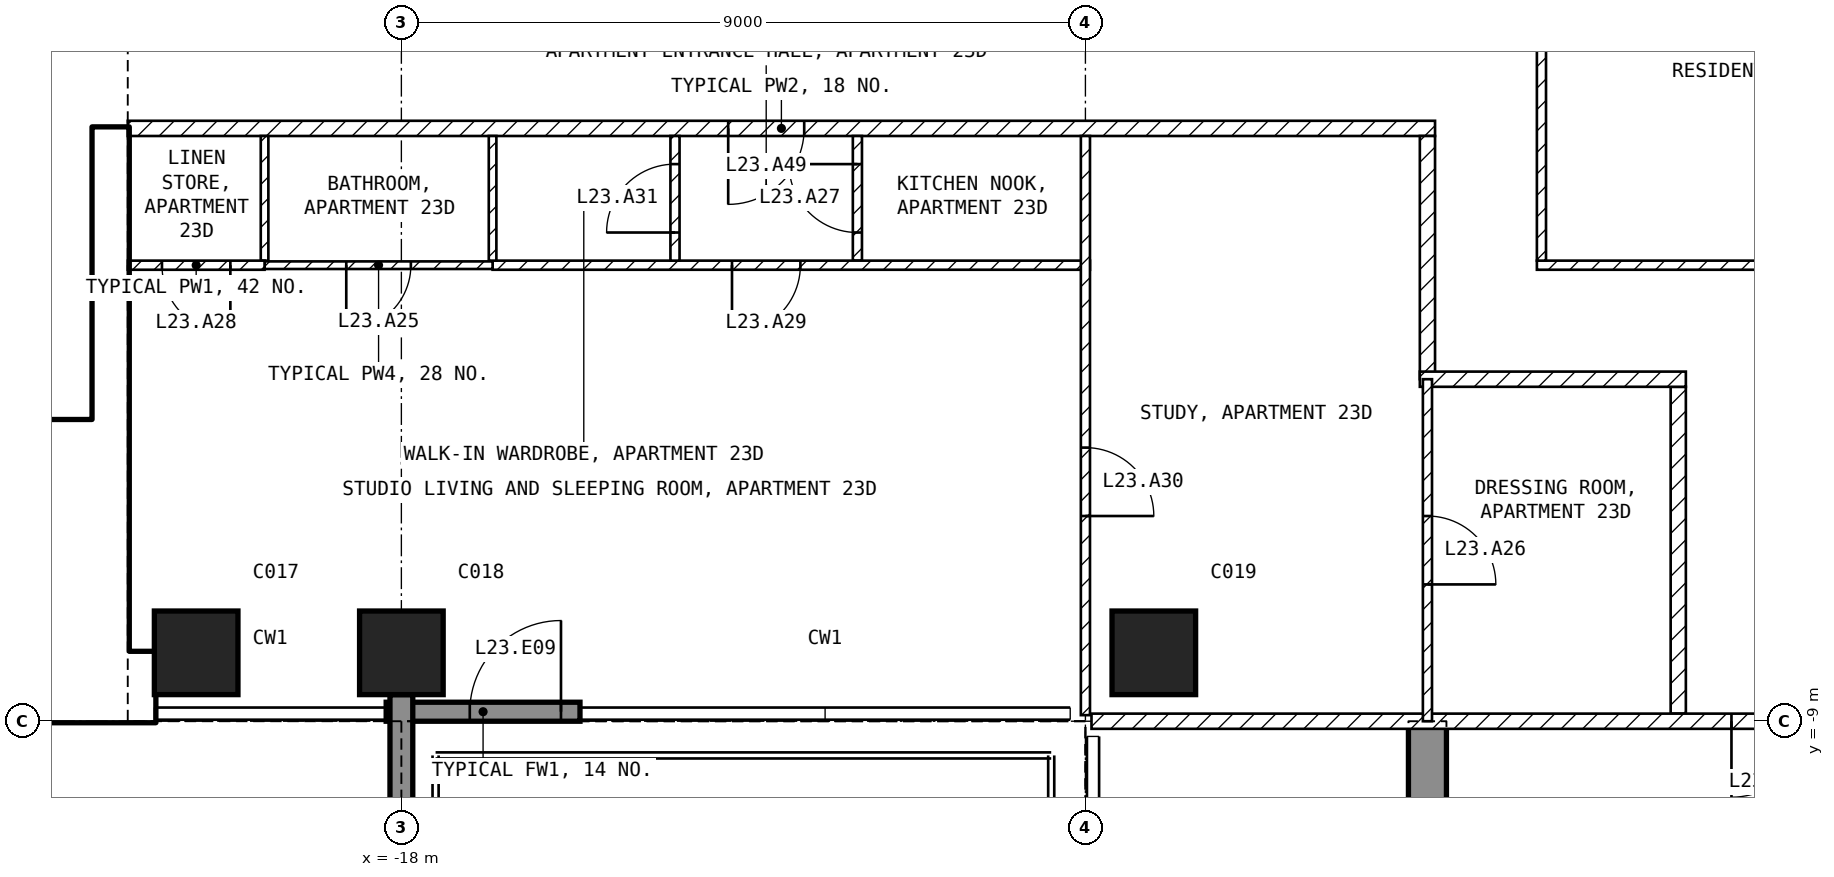
"""IFC4 building model, lengths in metres.
Left out: names, types, materials, properties, quantities, classifications, styles, units other than length and angle.
Written with IfcOpenShell. Run it as: python <this file> out.ifc"""

import sys

from ifc_helpers import new_model, si_unit, direction, frame, frame_2d, origin, origin_2d, place, context, subcontext, project, spatial, polyline, rectangle, outline, extrude, element, fill, save


model = new_model("IFC4")
c1 = context("Model", 3, precision=1e-05, world=origin(), true_north=direction((0.0, 1.0)))
c2 = subcontext(c1, "Body", "Model", "MODEL_VIEW")
j1 = project(units=[si_unit("LENGTHUNIT", "METRE"), si_unit("PLANEANGLEUNIT", "RADIAN")], contexts=[c1])
p1 = place(None, origin())
s1 = spatial("IfcSite", under=j1, at=p1, CompositionType="ELEMENT")
p2 = place(p1, origin())
s2 = spatial("IfcBuilding", under=s1, at=p2, CompositionType="ELEMENT")
p3 = place(p2, frame((0.0, 0.0, 102.4)))
s3 = spatial("IfcBuildingStorey", under=s2, at=p3, CompositionType="ELEMENT", Elevation=102.4)
for number, where, z_axis, x_axis in (
    (1, (-20.7, -8.1, -0.25), (0.0, 0.0, 1.0), (1.0, 0.0, 0.0)),
    (2, (-18.0, -8.1, -0.25), (0.0, 0.0, 1.0), (1.0, 0.0, 0.0)),
    (3, (-8.1, -8.1, -0.25), (0.0, 0.0, 1.0), (1.0, 0.0, 0.0)),
):
    element("IfcColumn", number, at=place(p3, frame(where, z_axis=z_axis, x_axis=x_axis)), inside=s3, PredefinedType="COLUMN", context=c2, shape_type="SweptSolid", body=[
        extrude(rectangle(XDim=1.1, YDim=1.1, at=origin_2d()), origin(), (0.0, 0.0, 1.0), 3.5),
    ])
p4 = place(p3, frame((-4.75, -20.15, -0.25), z_axis=(1.0, 0.0, 0.0), x_axis=(0.0, 1.0, 0.0)))
e4 = element("IfcWall", 4, at=p4, inside=s3, PredefinedType="SHEAR", context=c2, shape_type="SweptSolid", body=[
    extrude(outline(polyline([(0.0, 0.0), (6.65, 0.0), (6.65, 2.65), (9.05, 2.65), (9.05, 0.0), (11.15, 0.0), (11.15, 3.5), (0.0, 3.5), (0.0, 0.0)])), origin(), (0.0, 0.0, 1.0), 0.5),
])
p5 = place(p3, frame((-18.2, -8.875, 0.0), z_axis=(0.0, 0.0, 1.0), x_axis=(1.0, 0.0, 0.0)))
e5 = element("IfcWall", 5, at=p5, inside=s3, PredefinedType="SOLIDWALL", context=c2, shape_type="SweptSolid", body=[
    extrude(rectangle(XDim=2.55, YDim=0.25, at=frame_2d((1.275, 0.0))), origin(), (0.0, 0.0, 1.0), 3.25),
])
p6 = place(p5, frame((1.1, 0.0, 0.0)))
e6 = element("IfcOpeningElement", 6, at=p6, cuts=e5, PredefinedType="OPENING", context=c2, shape_type="SweptSolid", body=[
    extrude(rectangle(XDim=1.2, YDim=2.4, at=frame_2d((0.6, 1.2))), frame((0.0, 0.135, 0.0), z_axis=(0.0, -1.0, 0.0), x_axis=(1.0, 0.0, 0.0)), (0.0, 0.0, 1.0), 0.27),
])
p7 = place(p3, frame((-18.0, -8.65, 0.0), z_axis=(0.0, 0.0, 1.0), x_axis=(0.0, -1.0, 0.0)))
e7 = element("IfcWall", 7, at=p7, inside=s3, PredefinedType="SOLIDWALL", context=c2, shape_type="SweptSolid", body=[
    extrude(rectangle(XDim=3.09, YDim=0.3, at=frame_2d((1.545, 0.0))), origin(), (0.0, 0.0, 1.0), 3.25),
])
p8 = place(p3, frame((-30.2, -8.55, 0.0), z_axis=(0.0, 0.0, 1.0), x_axis=(1.0, 0.0, 0.0)))
e8 = element("IfcWall", 8, at=p8, inside=s3, PredefinedType="SHEAR", context=c2, shape_type="SweptSolid", body=[
    extrude(rectangle(XDim=8.95, YDim=0.9, at=frame_2d((4.475, 0.0))), origin(), (0.0, 0.0, 1.0), 3.25),
])
p9 = place(p3, frame((-21.825, -8.1, 0.0), z_axis=(0.0, 0.0, 1.0), x_axis=(0.0, 1.0, 0.0)))
e9 = element("IfcWall", 9, at=p9, inside=s3, PredefinedType="SHEAR", context=c2, shape_type="SweptSolid", body=[
    extrude(rectangle(XDim=6.9, YDim=0.45, at=frame_2d((3.45, 0.0))), origin(), (0.0, 0.0, 1.0), 3.25),
])
p10 = place(p3, frame((-28.35, -5.15, 0.0), z_axis=(0.0, 0.0, 1.0), x_axis=(1.0, 0.0, 0.0)))
e10 = element("IfcWall", 10, at=p10, inside=s3, PredefinedType="SOLIDWALL", context=c2, shape_type="SweptSolid", body=[
    extrude(rectangle(XDim=6.3, YDim=0.2, at=frame_2d((3.15, 0.0))), origin(), (0.0, 0.0, 1.0), 3.25),
])
p11 = place(p10, frame((5.1, 0.0, 0.0)))
e11 = element("IfcOpeningElement", 11, at=p11, cuts=e10, PredefinedType="OPENING", context=c2, shape_type="SweptSolid", body=[
    extrude(rectangle(XDim=1.0, YDim=2.1, at=frame_2d((0.5, 1.05))), frame((0.0, 0.11, 0.0), z_axis=(0.0, -1.0, 0.0), x_axis=(1.0, 0.0, 0.0)), (0.0, 0.0, 1.0), 0.22),
])
p12 = place(p3, frame((-3.06, -3.0, 0.0), z_axis=(0.0, 0.0, 1.0), x_axis=(1.0, 0.0, 0.0)))
e12 = element("IfcWall", 12, at=p12, inside=s3, PredefinedType="PARTITIONING", context=c2, shape_type="SweptSolid", body=[
    extrude(rectangle(XDim=6.12, YDim=0.12, at=frame_2d((3.06, 0.0))), origin(), (0.0, 0.0, 1.0), 3.25),
])
p13 = place(p3, frame((-3.0, 2.94, 0.0), z_axis=(0.0, 0.0, 1.0), x_axis=(0.0, -1.0, 0.0)))
e13 = element("IfcWall", 13, at=p13, inside=s3, PredefinedType="PARTITIONING", context=c2, shape_type="SweptSolid", body=[
    extrude(rectangle(XDim=5.88, YDim=0.12, at=frame_2d((2.94, 0.0))), origin(), (0.0, 0.0, 1.0), 3.25),
])
p14 = place(p3, frame((-4.4, -1.2, 0.0), z_axis=(0.0, 0.0, 1.0), x_axis=(-1.0, 0.0, 0.0)))
e14 = element("IfcWall", 14, at=p14, inside=s3, PredefinedType="PARTITIONING", context=c2, shape_type="SweptSolid", body=[
    extrude(rectangle(XDim=17.2, YDim=0.2, at=frame_2d((8.6, 0.0))), origin(), (0.0, 0.0, 1.0), 3.25),
])
p15 = place(p14, frame((8.3, 0.0, 0.0)))
e15 = element("IfcOpeningElement", 15, at=p15, cuts=e14, PredefinedType="OPENING", context=c2, shape_type="SweptSolid", body=[
    extrude(rectangle(XDim=1.0, YDim=2.1, at=frame_2d((0.5, 1.05))), frame((0.0, 0.11, 0.0), z_axis=(0.0, -1.0, 0.0), x_axis=(1.0, 0.0, 0.0)), (0.0, 0.0, 1.0), 0.22),
])
p16 = place(p3, frame((-4.5, -4.5, 0.0), z_axis=(0.0, 0.0, 1.0), x_axis=(0.0, 1.0, 0.0)))
e16 = element("IfcWall", 16, at=p16, inside=s3, PredefinedType="PARTITIONING", context=c2, shape_type="SweptSolid", body=[
    extrude(rectangle(XDim=3.2, YDim=0.2, at=frame_2d((1.6, 0.0))), origin(), (0.0, 0.0, 1.0), 3.25),
])
p17 = place(p3, frame((-1.2, -8.9, 0.0), z_axis=(0.0, 0.0, 1.0), x_axis=(0.0, 1.0, 0.0)))
e17 = element("IfcWall", 17, at=p17, inside=s3, PredefinedType="PARTITIONING", context=c2, shape_type="SweptSolid", body=[
    extrude(rectangle(XDim=4.3, YDim=0.2, at=frame_2d((2.15, 0.0))), origin(), (0.0, 0.0, 1.0), 3.25),
])
p18 = place(p3, frame((-1.1, -4.5, 0.0), z_axis=(0.0, 0.0, 1.0), x_axis=(-1.0, 0.0, 0.0)))
e18 = element("IfcWall", 18, at=p18, inside=s3, PredefinedType="PARTITIONING", context=c2, shape_type="SweptSolid", body=[
    extrude(rectangle(XDim=3.5, YDim=0.2, at=frame_2d((1.75, 0.0))), origin(), (0.0, 0.0, 1.0), 3.25),
])
p19 = place(p3, frame((8.92, -9.0, 0.0), z_axis=(0.0, 0.0, 1.0), x_axis=(-1.0, 0.0, 0.0)))
e19 = element("IfcWall", 19, at=p19, inside=s3, PredefinedType="PARTITIONING", context=c2, shape_type="SweptSolid", body=[
    extrude(rectangle(XDim=17.84, YDim=0.2, at=frame_2d((8.92, 0.0))), origin(), (0.0, 0.0, 1.0), 3.25),
])
p20 = place(p19, frame((8.42, 0.0, 0.0)))
e20 = element("IfcOpeningElement", 20, at=p20, cuts=e19, PredefinedType="OPENING", context=c2, shape_type="SweptSolid", body=[
    extrude(rectangle(XDim=1.0, YDim=2.1, at=frame_2d((0.5, 1.05))), frame((0.0, 0.11, 0.0), z_axis=(0.0, -1.0, 0.0), x_axis=(1.0, 0.0, 0.0)), (0.0, 0.0, 1.0), 0.22),
])
p21 = place(p3, frame((-12.0, -2.94, 0.0), z_axis=(0.0, 0.0, 1.0), x_axis=(0.0, 1.0, 0.0)))
e21 = element("IfcWall", 21, at=p21, inside=s3, PredefinedType="PARTITIONING", context=c2, shape_type="SweptSolid", body=[
    extrude(rectangle(XDim=1.64, YDim=0.12, at=frame_2d((0.82, 0.0))), origin(), (0.0, 0.0, 1.0), 3.25),
])
p22 = place(p21, frame((0.37, 0.0, 0.0)))
e22 = element("IfcOpeningElement", 22, at=p22, cuts=e21, PredefinedType="OPENING", context=c2, shape_type="SweptSolid", body=[
    extrude(rectangle(XDim=0.9, YDim=2.1, at=frame_2d((0.45, 1.05))), frame((0.0, 0.07, 0.0), z_axis=(0.0, -1.0, 0.0), x_axis=(1.0, 0.0, 0.0)), (0.0, 0.0, 1.0), 0.14),
])
p23 = place(p3, frame((-8.94, -3.0, 0.0), z_axis=(0.0, 0.0, 1.0), x_axis=(-1.0, 0.0, 0.0)))
e23 = element("IfcWall", 23, at=p23, inside=s3, PredefinedType="PARTITIONING", context=c2, shape_type="SweptSolid", body=[
    extrude(rectangle(XDim=7.86, YDim=0.12, at=frame_2d((3.93, 0.0))), origin(), (0.0, 0.0, 1.0), 3.25),
])
p24 = place(p23, frame((3.81, 0.0, 0.0)))
e24 = element("IfcOpeningElement", 24, at=p24, cuts=e23, PredefinedType="OPENING", context=c2, shape_type="SweptSolid", body=[
    extrude(rectangle(XDim=0.9, YDim=2.1, at=frame_2d((0.45, 1.05))), frame((0.0, 0.07, 0.0), z_axis=(0.0, -1.0, 0.0), x_axis=(1.0, 0.0, 0.0)), (0.0, 0.0, 1.0), 0.14),
])
p25 = place(p3, frame((-9.0, -1.3, 0.0), z_axis=(0.0, 0.0, 1.0), x_axis=(0.0, -1.0, 0.0)))
e25 = element("IfcWall", 25, at=p25, inside=s3, PredefinedType="PARTITIONING", context=c2, shape_type="SweptSolid", body=[
    extrude(rectangle(XDim=7.62, YDim=0.12, at=frame_2d((3.81, 0.0))), origin(), (0.0, 0.0, 1.0), 3.25),
])
p26 = place(p25, frame((4.1, 0.0, 0.0)))
e26 = element("IfcOpeningElement", 26, at=p26, cuts=e25, PredefinedType="OPENING", context=c2, shape_type="SweptSolid", body=[
    extrude(rectangle(XDim=0.9, YDim=2.1, at=frame_2d((0.45, 1.05))), frame((0.0, 0.07, 0.0), z_axis=(0.0, -1.0, 0.0), x_axis=(1.0, 0.0, 0.0)), (0.0, 0.0, 1.0), 0.14),
])
p27 = place(p3, frame((-14.4, -2.94, 0.0), z_axis=(0.0, 0.0, 1.0), x_axis=(0.0, 1.0, 0.0)))
e27 = element("IfcWall", 27, at=p27, inside=s3, PredefinedType="PARTITIONING", context=c2, shape_type="SweptSolid", body=[
    extrude(rectangle(XDim=1.64, YDim=0.12, at=frame_2d((0.82, 0.0))), origin(), (0.0, 0.0, 1.0), 3.25),
])
p28 = place(p27, frame((0.37, 0.0, 0.0)))
e28 = element("IfcOpeningElement", 28, at=p28, cuts=e27, PredefinedType="OPENING", context=c2, shape_type="SweptSolid", body=[
    extrude(rectangle(XDim=0.9, YDim=2.1, at=frame_2d((0.45, 1.05))), frame((0.0, 0.07, 0.0), z_axis=(0.0, -1.0, 0.0), x_axis=(1.0, 0.0, 0.0)), (0.0, 0.0, 1.0), 0.14),
])
for number, where, z_axis, x_axis in (
    (29, (-16.8, -2.94, 0.0), (0.0, 0.0, 1.0), (0.0, 1.0, 0.0)),
    (30, (-19.8, -2.94, 0.0), (0.0, 0.0, 1.0), (0.0, 1.0, 0.0)),
):
    element("IfcWall", number, at=place(p3, frame(where, z_axis=z_axis, x_axis=x_axis)), inside=s3, PredefinedType="PARTITIONING", context=c2, shape_type="SweptSolid", body=[
        extrude(rectangle(XDim=1.64, YDim=0.1, at=frame_2d((0.82, 0.0))), origin(), (0.0, 0.0, 1.0), 3.25),
    ])
p29 = place(p3, frame((-16.8, -3.0, 0.0), z_axis=(0.0, 0.0, 1.0), x_axis=(-1.0, 0.0, 0.0)))
e31 = element("IfcWall", 31, at=p29, inside=s3, PredefinedType="PARTITIONING", context=c2, shape_type="SweptSolid", body=[
    extrude(rectangle(XDim=3.0, YDim=0.1, at=frame_2d((1.5, 0.0))), origin(), (0.0, 0.0, 1.0), 3.25),
])
p30 = place(p29, frame((1.075, 0.0, 0.0)))
e32 = element("IfcOpeningElement", 32, at=p30, cuts=e31, PredefinedType="OPENING", context=c2, shape_type="SweptSolid", body=[
    extrude(rectangle(XDim=0.85, YDim=2.1, at=frame_2d((0.425, 1.05))), frame((0.0, 0.06, 0.0), z_axis=(0.0, -1.0, 0.0), x_axis=(1.0, 0.0, 0.0)), (0.0, 0.0, 1.0), 0.12),
])
p31 = place(p3, frame((-19.8, -3.0, 0.0), z_axis=(0.0, 0.0, 1.0), x_axis=(-1.0, 0.0, 0.0)))
e33 = element("IfcWall", 33, at=p31, inside=s3, PredefinedType="PARTITIONING", context=c2, shape_type="SweptSolid", body=[
    extrude(rectangle(XDim=1.8, YDim=0.12, at=frame_2d((0.9, 0.0))), origin(), (0.0, 0.0, 1.0), 3.25),
])
p32 = place(p31, frame((0.45, 0.0, 0.0)))
e34 = element("IfcOpeningElement", 34, at=p32, cuts=e33, PredefinedType="OPENING", context=c2, shape_type="SweptSolid", body=[
    extrude(rectangle(XDim=0.9, YDim=2.1, at=frame_2d((0.45, 1.05))), frame((0.0, 0.07, 0.0), z_axis=(0.0, -1.0, 0.0), x_axis=(1.0, 0.0, 0.0)), (0.0, 0.0, 1.0), 0.14),
])
p33 = place(p3, frame((-4.5, -4.5, 0.0), z_axis=(0.0, 0.0, 1.0), x_axis=(0.0, -1.0, 0.0)))
e35 = element("IfcWall", 35, at=p33, inside=s3, PredefinedType="PARTITIONING", context=c2, shape_type="SweptSolid", body=[
    extrude(rectangle(XDim=4.5, YDim=0.12, at=frame_2d((2.25, 0.0))), origin(), (0.0, 0.0, 1.0), 3.25),
])
p34 = place(p33, frame((1.8, 0.0, 0.0)))
e36 = element("IfcOpeningElement", 36, at=p34, cuts=e35, PredefinedType="OPENING", context=c2, shape_type="SweptSolid", body=[
    extrude(rectangle(XDim=0.9, YDim=2.1, at=frame_2d((0.45, 1.05))), frame((0.0, 0.07, 0.0), z_axis=(0.0, -1.0, 0.0), x_axis=(1.0, 0.0, 0.0)), (0.0, 0.0, 1.0), 0.14),
])
p35 = place(p6, origin())
e37 = element("IfcDoor", 37, at=p35, inside=s3, OperationType="SINGLE_SWING_RIGHT", PredefinedType="DOOR", context=c2, shape_type="SweptSolid", body=[
    extrude(rectangle(XDim=1.2, YDim=2.4, at=frame_2d((0.6, 1.2))), frame((0.0, 0.025, 0.0), z_axis=(0.0, -1.0, 0.0), x_axis=(1.0, 0.0, 0.0)), (0.0, 0.0, 1.0), 0.05),
])
fill(e6, e37)
p36 = place(p11, origin())
e38 = element("IfcDoor", 38, at=p36, inside=s3, OperationType="SINGLE_SWING_LEFT", PredefinedType="DOOR", context=c2, shape_type="SweptSolid", body=[
    extrude(rectangle(XDim=1.0, YDim=2.1, at=frame_2d((0.5, 1.05))), frame((0.0, 0.025, 0.0), z_axis=(0.0, -1.0, 0.0), x_axis=(1.0, 0.0, 0.0)), (0.0, 0.0, 1.0), 0.05),
])
fill(e11, e38)
p37 = place(p30, origin())
e39 = element("IfcDoor", 39, at=p37, inside=s3, OperationType="SINGLE_SWING_RIGHT", PredefinedType="DOOR", context=c2, shape_type="SweptSolid", body=[
    extrude(rectangle(XDim=0.85, YDim=2.1, at=frame_2d((0.425, 1.05))), frame((0.0, 0.025, 0.0), z_axis=(0.0, -1.0, 0.0), x_axis=(1.0, 0.0, 0.0)), (0.0, 0.0, 1.0), 0.05),
])
fill(e32, e39)
p38 = place(p34, origin())
e40 = element("IfcDoor", 40, at=p38, inside=s3, OperationType="SINGLE_SWING_RIGHT", PredefinedType="DOOR", context=c2, shape_type="SweptSolid", body=[
    extrude(rectangle(XDim=0.9, YDim=2.1, at=frame_2d((0.45, 1.05))), frame((0.0, 0.025, 0.0), z_axis=(0.0, -1.0, 0.0), x_axis=(1.0, 0.0, 0.0)), (0.0, 0.0, 1.0), 0.05),
])
fill(e36, e40)
p39 = place(p22, origin())
e41 = element("IfcDoor", 41, at=p39, inside=s3, OperationType="SINGLE_SWING_RIGHT", PredefinedType="DOOR", context=c2, shape_type="SweptSolid", body=[
    extrude(rectangle(XDim=0.9, YDim=2.1, at=frame_2d((0.45, 1.05))), frame((0.0, 0.025, 0.0), z_axis=(0.0, -1.0, 0.0), x_axis=(1.0, 0.0, 0.0)), (0.0, 0.0, 1.0), 0.05),
])
fill(e22, e41)
p40 = place(p32, origin())
e42 = element("IfcDoor", 42, at=p40, inside=s3, OperationType="SINGLE_SWING_LEFT", PredefinedType="DOOR", context=c2, shape_type="SweptSolid", body=[
    extrude(rectangle(XDim=0.9, YDim=2.1, at=frame_2d((0.45, 1.05))), frame((0.0, 0.025, 0.0), z_axis=(0.0, -1.0, 0.0), x_axis=(1.0, 0.0, 0.0)), (0.0, 0.0, 1.0), 0.05),
])
fill(e34, e42)
p41 = place(p24, origin())
e43 = element("IfcDoor", 43, at=p41, inside=s3, OperationType="SINGLE_SWING_RIGHT", PredefinedType="DOOR", context=c2, shape_type="SweptSolid", body=[
    extrude(rectangle(XDim=0.9, YDim=2.1, at=frame_2d((0.45, 1.05))), frame((0.0, 0.025, 0.0), z_axis=(0.0, -1.0, 0.0), x_axis=(1.0, 0.0, 0.0)), (0.0, 0.0, 1.0), 0.05),
])
fill(e24, e43)
p42 = place(p26, origin())
e44 = element("IfcDoor", 44, at=p42, inside=s3, OperationType="SINGLE_SWING_RIGHT", PredefinedType="DOOR", context=c2, shape_type="SweptSolid", body=[
    extrude(rectangle(XDim=0.9, YDim=2.1, at=frame_2d((0.45, 1.05))), frame((0.0, 0.025, 0.0), z_axis=(0.0, -1.0, 0.0), x_axis=(1.0, 0.0, 0.0)), (0.0, 0.0, 1.0), 0.05),
])
fill(e26, e44)
p43 = place(p28, origin())
e45 = element("IfcDoor", 45, at=p43, inside=s3, OperationType="SINGLE_SWING_LEFT", PredefinedType="DOOR", context=c2, shape_type="SweptSolid", body=[
    extrude(rectangle(XDim=0.9, YDim=2.1, at=frame_2d((0.45, 1.05))), frame((0.0, 0.025, 0.0), z_axis=(0.0, -1.0, 0.0), x_axis=(1.0, 0.0, 0.0)), (0.0, 0.0, 1.0), 0.05),
])
fill(e28, e45)
p44 = place(p20, origin())
e46 = element("IfcDoor", 46, at=p44, inside=s3, OperationType="SINGLE_SWING_RIGHT", PredefinedType="DOOR", context=c2, shape_type="SweptSolid", body=[
    extrude(rectangle(XDim=1.0, YDim=2.1, at=frame_2d((0.5, 1.05))), frame((0.0, 0.025, 0.0), z_axis=(0.0, -1.0, 0.0), x_axis=(1.0, 0.0, 0.0)), (0.0, 0.0, 1.0), 0.05),
])
fill(e20, e46)
p45 = place(p15, origin())
e47 = element("IfcDoor", 47, at=p45, inside=s3, OperationType="SINGLE_SWING_RIGHT", PredefinedType="DOOR", context=c2, shape_type="SweptSolid", body=[
    extrude(rectangle(XDim=1.0, YDim=2.1, at=frame_2d((0.5, 1.05))), frame((0.0, 0.025, 0.0), z_axis=(0.0, -1.0, 0.0), x_axis=(1.0, 0.0, 0.0)), (0.0, 0.0, 1.0), 0.05),
])
fill(e15, e47)
save(model, sys.argv[1])
